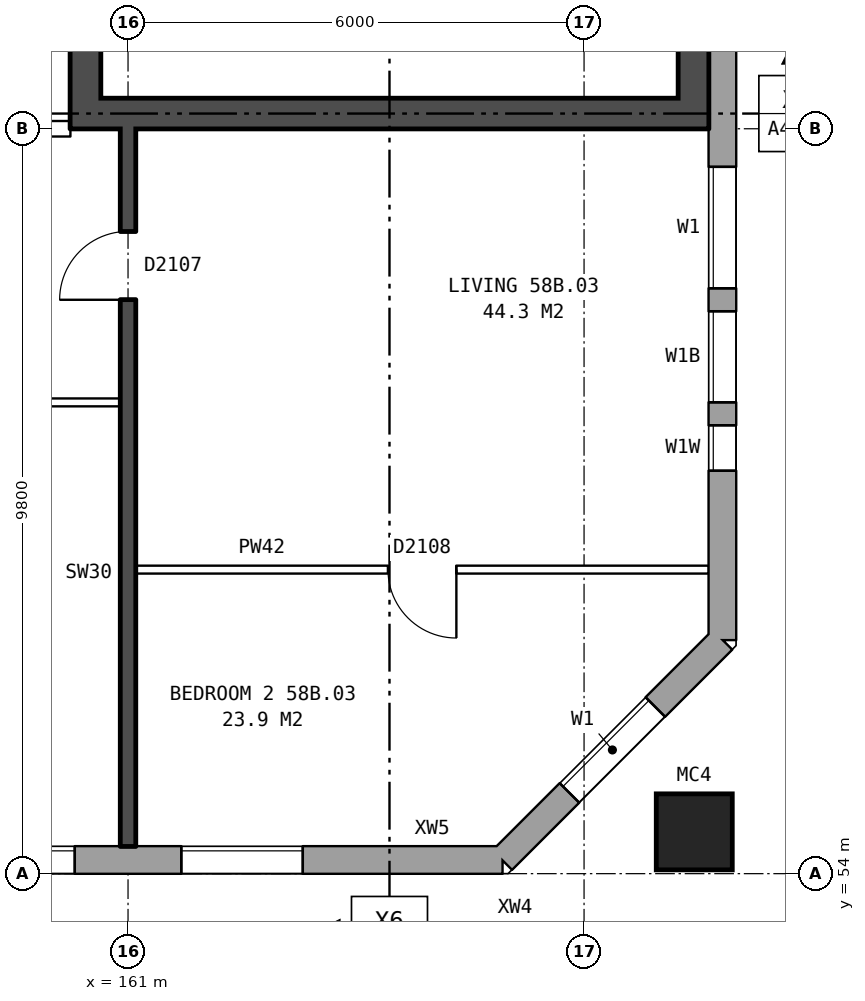
"""IFC4 building model, lengths in metres.
Left out: names, types, materials, properties, quantities, classifications, styles, units other than length and angle.
Written with IfcOpenShell. Run it as: python <this file> out.ifc"""

import sys

from ifc_helpers import new_model, si_unit, direction, frame, frame_2d, origin, origin_2d, place, context, subcontext, project, spatial, rectangle, hollow_rectangle, extrude, element, fill, save


model = new_model("IFC4")
c1 = context("Model", 3, precision=1e-05, world=origin(), true_north=direction((0.0, 1.0)))
c2 = subcontext(c1, "Body", "Model", "MODEL_VIEW")
j1 = project(units=[si_unit("LENGTHUNIT", "METRE"), si_unit("PLANEANGLEUNIT", "RADIAN")], contexts=[c1])
p1 = place(None, origin())
s1 = spatial("IfcSite", under=j1, at=p1, CompositionType="ELEMENT")
p2 = place(p1, origin())
s2 = spatial("IfcBuilding", under=s1, at=p2, CompositionType="ELEMENT")
p3 = place(p2, frame((0.0, 0.0, 205.9)))
s3 = spatial("IfcBuildingStorey", under=s2, at=p3, CompositionType="ELEMENT", Elevation=205.9)
p4 = place(p3, frame((168.45, 54.55, 0.0), z_axis=(0.0, 0.0, 1.0), x_axis=(1.0, 0.0, 0.0)))
e1 = element("IfcColumn", 1, at=p4, inside=s3, PredefinedType="COLUMN", context=c2, shape_type="SweptSolid", body=[
    extrude(hollow_rectangle(XDim=1.0, YDim=1.0, WallThickness=0.055, at=origin_2d()), origin(), (0.0, 0.0, 1.0), 3.1),
])
p5 = place(p3, frame((132.05, 54.18, 0.0), z_axis=(0.0, 0.0, 1.0), x_axis=(1.0, 0.0, 0.0)))
e2 = element("IfcWall", 2, at=p5, inside=s3, PredefinedType="STANDARD", context=c2, shape_type="SweptSolid", body=[
    extrude(rectangle(XDim=33.875, YDim=0.36, at=frame_2d((16.938, 0.0))), origin(), (0.0, 0.0, 1.0), 2.85),
])
p6 = place(p5, frame((0.3, 0.0, 0.9)))
e3 = element("IfcOpeningElement", 3, at=p6, cuts=e2, PredefinedType="OPENING", context=c2, shape_type="SweptSolid", body=[
    extrude(rectangle(XDim=0.8, YDim=1.5, at=frame_2d((0.4, 0.75))), frame((0.0, 0.19, 0.0), z_axis=(0.0, -1.0, 0.0), x_axis=(1.0, 0.0, 0.0)), (0.0, 0.0, 1.0), 0.38),
])
p7 = place(p5, frame((5.65, 0.0, 0.8)))
e4 = element("IfcOpeningElement", 4, at=p7, cuts=e2, PredefinedType="OPENING", context=c2, shape_type="SweptSolid", body=[
    extrude(rectangle(XDim=1.6, YDim=1.8, at=frame_2d((0.8, 0.9))), frame((0.0, 0.19, 0.0), z_axis=(0.0, -1.0, 0.0), x_axis=(1.0, 0.0, 0.0)), (0.0, 0.0, 1.0), 0.38),
])
p8 = place(p5, frame((8.65, 0.0, 0.8)))
e5 = element("IfcOpeningElement", 5, at=p8, cuts=e2, PredefinedType="OPENING", context=c2, shape_type="SweptSolid", body=[
    extrude(rectangle(XDim=1.6, YDim=1.8, at=frame_2d((0.8, 0.9))), frame((0.0, 0.19, 0.0), z_axis=(0.0, -1.0, 0.0), x_axis=(1.0, 0.0, 0.0)), (0.0, 0.0, 1.0), 0.38),
])
p9 = place(p5, frame((11.65, 0.0, 0.8)))
e6 = element("IfcOpeningElement", 6, at=p9, cuts=e2, PredefinedType="OPENING", context=c2, shape_type="SweptSolid", body=[
    extrude(rectangle(XDim=1.6, YDim=1.8, at=frame_2d((0.8, 0.9))), frame((0.0, 0.19, 0.0), z_axis=(0.0, -1.0, 0.0), x_axis=(1.0, 0.0, 0.0)), (0.0, 0.0, 1.0), 0.38),
])
p10 = place(p5, frame((14.65, 0.0, 0.8)))
e7 = element("IfcOpeningElement", 7, at=p10, cuts=e2, PredefinedType="OPENING", context=c2, shape_type="SweptSolid", body=[
    extrude(rectangle(XDim=1.6, YDim=1.8, at=frame_2d((0.8, 0.9))), frame((0.0, 0.19, 0.0), z_axis=(0.0, -1.0, 0.0), x_axis=(1.0, 0.0, 0.0)), (0.0, 0.0, 1.0), 0.38),
])
p11 = place(p5, frame((17.65, 0.0, 0.8)))
e8 = element("IfcOpeningElement", 8, at=p11, cuts=e2, PredefinedType="OPENING", context=c2, shape_type="SweptSolid", body=[
    extrude(rectangle(XDim=1.6, YDim=1.8, at=frame_2d((0.8, 0.9))), frame((0.0, 0.19, 0.0), z_axis=(0.0, -1.0, 0.0), x_axis=(1.0, 0.0, 0.0)), (0.0, 0.0, 1.0), 0.38),
])
p12 = place(p5, frame((20.65, 0.0, 0.8)))
e9 = element("IfcOpeningElement", 9, at=p12, cuts=e2, PredefinedType="OPENING", context=c2, shape_type="SweptSolid", body=[
    extrude(rectangle(XDim=1.6, YDim=1.8, at=frame_2d((0.8, 0.9))), frame((0.0, 0.19, 0.0), z_axis=(0.0, -1.0, 0.0), x_axis=(1.0, 0.0, 0.0)), (0.0, 0.0, 1.0), 0.38),
])
p13 = place(p5, frame((23.65, 0.0, 0.8)))
e10 = element("IfcOpeningElement", 10, at=p13, cuts=e2, PredefinedType="OPENING", context=c2, shape_type="SweptSolid", body=[
    extrude(rectangle(XDim=1.6, YDim=1.8, at=frame_2d((0.8, 0.9))), frame((0.0, 0.19, 0.0), z_axis=(0.0, -1.0, 0.0), x_axis=(1.0, 0.0, 0.0)), (0.0, 0.0, 1.0), 0.38),
])
p14 = place(p5, frame((26.65, 0.0, 0.8)))
e11 = element("IfcOpeningElement", 11, at=p14, cuts=e2, PredefinedType="OPENING", context=c2, shape_type="SweptSolid", body=[
    extrude(rectangle(XDim=1.6, YDim=1.8, at=frame_2d((0.8, 0.9))), frame((0.0, 0.19, 0.0), z_axis=(0.0, -1.0, 0.0), x_axis=(1.0, 0.0, 0.0)), (0.0, 0.0, 1.0), 0.38),
])
p15 = place(p5, frame((29.65, 0.0, 0.8)))
e12 = element("IfcOpeningElement", 12, at=p15, cuts=e2, PredefinedType="OPENING", context=c2, shape_type="SweptSolid", body=[
    extrude(rectangle(XDim=1.6, YDim=1.8, at=frame_2d((0.8, 0.9))), frame((0.0, 0.19, 0.0), z_axis=(0.0, -1.0, 0.0), x_axis=(1.0, 0.0, 0.0)), (0.0, 0.0, 1.0), 0.38),
])
p16 = place(p5, frame((3.2, 0.0, 0.8)))
e13 = element("IfcOpeningElement", 13, at=p16, cuts=e2, PredefinedType="OPENING", context=c2, shape_type="SweptSolid", body=[
    extrude(rectangle(XDim=1.4, YDim=1.8, at=frame_2d((0.7, 0.9))), frame((0.0, 0.19, 0.0), z_axis=(0.0, -1.0, 0.0), x_axis=(1.0, 0.0, 0.0)), (0.0, 0.0, 1.0), 0.38),
])
p17 = place(p3, frame((165.925, 54.18, 0.0), z_axis=(0.0, 0.0, 1.0), x_axis=(0.707106781187, 0.707106781187, 0.0)))
e14 = element("IfcWall", 14, at=p17, inside=s3, PredefinedType="STANDARD", context=c2, shape_type="SweptSolid", body=[
    extrude(rectangle(XDim=4.094, YDim=0.36, at=frame_2d((2.047, 0.0))), origin(), (0.0, 0.0, 1.0), 2.85),
])
p18 = place(p17, frame((1.247, 0.0, 0.8)))
e15 = element("IfcOpeningElement", 15, at=p18, cuts=e14, PredefinedType="OPENING", context=c2, shape_type="SweptSolid", body=[
    extrude(rectangle(XDim=1.6, YDim=1.8, at=frame_2d((0.8, 0.9))), frame((0.0, 0.19, 0.0), z_axis=(0.0, -1.0, 0.0), x_axis=(1.0, 0.0, 0.0)), (0.0, 0.0, 1.0), 0.38),
])
p19 = place(p3, frame((168.82, 57.075, 0.0), z_axis=(0.0, 0.0, 1.0), x_axis=(0.0, 1.0, 0.0)))
e16 = element("IfcWall", 16, at=p19, inside=s3, PredefinedType="STANDARD", context=c2, shape_type="SweptSolid", body=[
    extrude(rectangle(XDim=25.851, YDim=0.36, at=frame_2d((12.925, 0.0))), origin(), (0.0, 0.0, 1.0), 2.85),
])
p20 = place(p19, frame((2.225, 0.0, 0.8)))
e17 = element("IfcOpeningElement", 17, at=p20, cuts=e16, PredefinedType="OPENING", context=c2, shape_type="SweptSolid", body=[
    extrude(rectangle(XDim=0.6, YDim=0.9, at=frame_2d((0.3, 0.45))), frame((0.0, 0.19, 0.0), z_axis=(0.0, -1.0, 0.0), x_axis=(1.0, 0.0, 0.0)), (0.0, 0.0, 1.0), 0.38),
])
p21 = place(p19, frame((4.625, 0.0, 0.8)))
e18 = element("IfcOpeningElement", 18, at=p21, cuts=e16, PredefinedType="OPENING", context=c2, shape_type="SweptSolid", body=[
    extrude(rectangle(XDim=1.6, YDim=1.8, at=frame_2d((0.8, 0.9))), frame((0.0, 0.19, 0.0), z_axis=(0.0, -1.0, 0.0), x_axis=(1.0, 0.0, 0.0)), (0.0, 0.0, 1.0), 0.38),
])
p22 = place(p19, frame((19.625, 0.0, 0.8)))
e19 = element("IfcOpeningElement", 19, at=p22, cuts=e16, PredefinedType="OPENING", context=c2, shape_type="SweptSolid", body=[
    extrude(rectangle(XDim=1.6, YDim=1.8, at=frame_2d((0.8, 0.9))), frame((0.0, 0.19, 0.0), z_axis=(0.0, -1.0, 0.0), x_axis=(1.0, 0.0, 0.0)), (0.0, 0.0, 1.0), 0.38),
])
p23 = place(p19, frame((21.525, 0.0, 0.8)))
e20 = element("IfcOpeningElement", 20, at=p23, cuts=e16, PredefinedType="OPENING", context=c2, shape_type="SweptSolid", body=[
    extrude(rectangle(XDim=1.2, YDim=1.8, at=frame_2d((0.6, 0.9))), frame((0.0, 0.19, 0.0), z_axis=(0.0, -1.0, 0.0), x_axis=(1.0, 0.0, 0.0)), (0.0, 0.0, 1.0), 0.38),
])
p24 = place(p19, frame((3.125, 0.0, 0.8)))
e21 = element("IfcOpeningElement", 21, at=p24, cuts=e16, PredefinedType="OPENING", context=c2, shape_type="SweptSolid", body=[
    extrude(rectangle(XDim=1.2, YDim=1.8, at=frame_2d((0.6, 0.9))), frame((0.0, 0.19, 0.0), z_axis=(0.0, -1.0, 0.0), x_axis=(1.0, 0.0, 0.0)), (0.0, 0.0, 1.0), 0.38),
])
p25 = place(p19, frame((23.025, 0.0, 0.8)))
e22 = element("IfcOpeningElement", 22, at=p25, cuts=e16, PredefinedType="OPENING", context=c2, shape_type="SweptSolid", body=[
    extrude(rectangle(XDim=0.6, YDim=0.9, at=frame_2d((0.3, 0.45))), frame((0.0, 0.19, 0.0), z_axis=(0.0, -1.0, 0.0), x_axis=(1.0, 0.0, 0.0)), (0.0, 0.0, 1.0), 0.38),
])
p26 = place(p3, frame((160.44, 76.2, 0.0), z_axis=(0.0, 0.0, 1.0), x_axis=(0.0, -1.0, 0.0)))
e23 = element("IfcWall", 23, at=p26, inside=s3, PredefinedType="SHEAR", context=c2, shape_type="SweptSolid", body=[
    extrude(rectangle(XDim=12.4, YDim=0.4, at=frame_2d((6.2, 0.0))), origin(), (0.0, 0.0, 1.0), 2.85),
])
p27 = place(p26, frame((1.325, 0.0, 0.0)))
e24 = element("IfcOpeningElement", 24, at=p27, cuts=e23, PredefinedType="OPENING", context=c2, shape_type="SweptSolid", body=[
    extrude(rectangle(XDim=1.1, YDim=2.1, at=frame_2d((0.55, 1.05))), frame((0.0, 0.21, 0.0), z_axis=(0.0, -1.0, 0.0), x_axis=(1.0, 0.0, 0.0)), (0.0, 0.0, 1.0), 0.42),
])
p28 = place(p26, frame((4.825, 0.0, 0.0)))
e25 = element("IfcOpeningElement", 25, at=p28, cuts=e23, PredefinedType="OPENING", context=c2, shape_type="SweptSolid", body=[
    extrude(rectangle(XDim=0.85, YDim=2.1, at=frame_2d((0.425, 1.05))), frame((0.0, 0.21, 0.0), z_axis=(0.0, -1.0, 0.0), x_axis=(1.0, 0.0, 0.0)), (0.0, 0.0, 1.0), 0.42),
])
p29 = place(p26, frame((9.9, 0.0, 0.0)))
e26 = element("IfcOpeningElement", 26, at=p29, cuts=e23, PredefinedType="OPENING", context=c2, shape_type="SweptSolid", body=[
    extrude(rectangle(XDim=1.1, YDim=2.1, at=frame_2d((0.55, 1.05))), frame((0.0, 0.21, 0.0), z_axis=(0.0, -1.0, 0.0), x_axis=(1.0, 0.0, 0.0)), (0.0, 0.0, 1.0), 0.42),
])
p30 = place(p26, frame((8.125, 0.0, 0.0)))
e27 = element("IfcOpeningElement", 27, at=p30, cuts=e23, PredefinedType="OPENING", context=c2, shape_type="SweptSolid", body=[
    extrude(rectangle(XDim=0.85, YDim=2.1, at=frame_2d((0.425, 1.05))), frame((0.0, 0.21, 0.0), z_axis=(0.0, -1.0, 0.0), x_axis=(1.0, 0.0, 0.0)), (0.0, 0.0, 1.0), 0.42),
])
p31 = place(p3, frame((168.44, 76.2, 0.0), z_axis=(0.0, 0.0, 1.0), x_axis=(0.0, -1.0, 0.0)))
e28 = element("IfcWall", 28, at=p31, inside=s3, PredefinedType="SHEAR", context=c2, shape_type="SweptSolid", body=[
    extrude(rectangle(XDim=12.4, YDim=0.4, at=frame_2d((6.2, 0.0))), origin(), (0.0, 0.0, 1.0), 2.85),
])
p32 = place(p3, frame((160.64, 64.0, 0.0), z_axis=(0.0, 0.0, 1.0), x_axis=(1.0, 0.0, 0.0)))
e29 = element("IfcWall", 29, at=p32, inside=s3, PredefinedType="SHEAR", context=c2, shape_type="SweptSolid", body=[
    extrude(rectangle(XDim=7.6, YDim=0.4, at=frame_2d((3.8, 0.0))), origin(), (0.0, 0.0, 1.0), 2.85),
])
p33 = place(p3, frame((161.1, 58.0, 0.0), z_axis=(0.0, 0.0, 1.0), x_axis=(1.0, 0.0, 0.0)))
e30 = element("IfcWall", 30, at=p33, inside=s3, PredefinedType="PARTITIONING", context=c2, shape_type="SweptSolid", body=[
    extrude(rectangle(XDim=7.54, YDim=0.1, at=frame_2d((3.77, 0.0))), origin(), (0.0, 0.0, 1.0), 2.85),
])
p34 = place(p33, frame((3.32, 0.0, 0.0)))
e31 = element("IfcOpeningElement", 31, at=p34, cuts=e30, PredefinedType="OPENING", context=c2, shape_type="SweptSolid", body=[
    extrude(rectangle(XDim=0.9, YDim=2.1, at=frame_2d((0.45, 1.05))), frame((0.0, 0.06, 0.0), z_axis=(0.0, -1.0, 0.0), x_axis=(1.0, 0.0, 0.0)), (0.0, 0.0, 1.0), 0.12),
])
p35 = place(p3, frame((155.1, 60.2, 0.0), z_axis=(0.0, 0.0, 1.0), x_axis=(1.0, 0.0, 0.0)))
e32 = element("IfcWall", 32, at=p35, inside=s3, PredefinedType="PARTITIONING", context=c2, shape_type="SweptSolid", body=[
    extrude(rectangle(XDim=5.8, YDim=0.1, at=frame_2d((2.9, 0.0))), origin(), (0.0, 0.0, 1.0), 2.85),
])
p36 = place(p35, frame((3.6, 0.0, 0.0)))
e33 = element("IfcOpeningElement", 33, at=p36, cuts=e32, PredefinedType="OPENING", context=c2, shape_type="SweptSolid", body=[
    extrude(rectangle(XDim=0.9, YDim=2.1, at=frame_2d((0.45, 1.05))), frame((0.0, 0.06, 0.0), z_axis=(0.0, -1.0, 0.0), x_axis=(1.0, 0.0, 0.0)), (0.0, 0.0, 1.0), 0.12),
])
p37 = place(p35, frame((0.7, 0.0, 0.0)))
e34 = element("IfcOpeningElement", 34, at=p37, cuts=e32, PredefinedType="OPENING", context=c2, shape_type="SweptSolid", body=[
    extrude(rectangle(XDim=0.9, YDim=2.1, at=frame_2d((0.45, 1.05))), frame((0.0, 0.06, 0.0), z_axis=(0.0, -1.0, 0.0), x_axis=(1.0, 0.0, 0.0)), (0.0, 0.0, 1.0), 0.12),
])
p38 = place(p3, frame((157.24, 63.8, 0.0), z_axis=(0.0, 0.0, 1.0), x_axis=(1.0, 0.0, 0.0)))
e35 = element("IfcWall", 35, at=p38, inside=s3, PredefinedType="PARTITIONING", context=c2, shape_type="SweptSolid", body=[
    extrude(rectangle(XDim=3.0, YDim=0.2, at=frame_2d((1.5, 0.0))), origin(), (0.0, 0.0, 1.0), 2.85),
])
p39 = place(p38, frame((1.0, 0.0, 0.0)))
e36 = element("IfcOpeningElement", 36, at=p39, cuts=e35, PredefinedType="OPENING", context=c2, shape_type="SweptSolid", body=[
    extrude(rectangle(XDim=1.0, YDim=2.1, at=frame_2d((0.5, 1.05))), frame((0.0, 0.11, 0.0), z_axis=(0.0, -1.0, 0.0), x_axis=(1.0, 0.0, 0.0)), (0.0, 0.0, 1.0), 0.22),
])
p40 = place(p3, frame((161.0, 54.36, 0.0), z_axis=(0.0, 0.0, 1.0), x_axis=(0.0, 1.0, 0.0)))
e37 = element("IfcWall", 37, at=p40, inside=s3, PredefinedType="SOLIDWALL", context=c2, shape_type="SweptSolid", body=[
    extrude(rectangle(XDim=9.44, YDim=0.2, at=frame_2d((4.72, 0.0))), origin(), (0.0, 0.0, 1.0), 2.85),
])
p41 = place(p40, frame((7.19, 0.0, 0.0)))
e38 = element("IfcOpeningElement", 38, at=p41, cuts=e37, PredefinedType="OPENING", context=c2, shape_type="SweptSolid", body=[
    extrude(rectangle(XDim=0.9, YDim=2.1, at=frame_2d((0.45, 1.05))), frame((0.0, 0.11, 0.0), z_axis=(0.0, -1.0, 0.0), x_axis=(1.0, 0.0, 0.0)), (0.0, 0.0, 1.0), 0.22),
])
p42 = place(p14, origin())
e39 = element("IfcWindow", 39, at=p42, inside=s3, PartitioningType="SINGLE_PANEL", PredefinedType="WINDOW", context=c2, shape_type="SweptSolid", body=[
    extrude(rectangle(XDim=1.6, YDim=1.8, at=frame_2d((0.8, 0.9))), frame((0.0, 0.15, 0.0), z_axis=(0.0, -1.0, 0.0), x_axis=(1.0, 0.0, 0.0)), (0.0, 0.0, 1.0), 0.06),
])
fill(e11, e39)
p43 = place(p15, origin())
e40 = element("IfcWindow", 40, at=p43, inside=s3, PartitioningType="SINGLE_PANEL", PredefinedType="WINDOW", context=c2, shape_type="SweptSolid", body=[
    extrude(rectangle(XDim=1.6, YDim=1.8, at=frame_2d((0.8, 0.9))), frame((0.0, 0.15, 0.0), z_axis=(0.0, -1.0, 0.0), x_axis=(1.0, 0.0, 0.0)), (0.0, 0.0, 1.0), 0.06),
])
fill(e12, e40)
p44 = place(p18, origin())
e41 = element("IfcWindow", 41, at=p44, inside=s3, PartitioningType="SINGLE_PANEL", PredefinedType="WINDOW", context=c2, shape_type="SweptSolid", body=[
    extrude(rectangle(XDim=1.6, YDim=1.8, at=frame_2d((0.8, 0.9))), frame((0.0, 0.15, 0.0), z_axis=(0.0, -1.0, 0.0), x_axis=(1.0, 0.0, 0.0)), (0.0, 0.0, 1.0), 0.06),
])
fill(e15, e41)
p45 = place(p20, origin())
e42 = element("IfcWindow", 42, at=p45, inside=s3, PartitioningType="SINGLE_PANEL", PredefinedType="WINDOW", context=c2, shape_type="SweptSolid", body=[
    extrude(rectangle(XDim=0.6, YDim=0.9, at=frame_2d((0.3, 0.45))), frame((0.0, 0.15, 0.0), z_axis=(0.0, -1.0, 0.0), x_axis=(1.0, 0.0, 0.0)), (0.0, 0.0, 1.0), 0.06),
])
fill(e17, e42)
p46 = place(p21, origin())
e43 = element("IfcWindow", 43, at=p46, inside=s3, PartitioningType="SINGLE_PANEL", PredefinedType="WINDOW", context=c2, shape_type="SweptSolid", body=[
    extrude(rectangle(XDim=1.6, YDim=1.8, at=frame_2d((0.8, 0.9))), frame((0.0, 0.15, 0.0), z_axis=(0.0, -1.0, 0.0), x_axis=(1.0, 0.0, 0.0)), (0.0, 0.0, 1.0), 0.06),
])
fill(e18, e43)
p47 = place(p34, frame((0.9, 0.0, 0.0), z_axis=(0.0, 0.0, 1.0), x_axis=(-1.0, 0.0, 0.0)))
e44 = element("IfcDoor", 44, at=p47, inside=s3, OperationType="SINGLE_SWING_LEFT", PredefinedType="DOOR", context=c2, shape_type="SweptSolid", body=[
    extrude(rectangle(XDim=0.9, YDim=2.1, at=frame_2d((0.45, 1.05))), frame((0.0, 0.025, 0.0), z_axis=(0.0, -1.0, 0.0), x_axis=(1.0, 0.0, 0.0)), (0.0, 0.0, 1.0), 0.05),
])
fill(e31, e44)
p48 = place(p41, origin())
e45 = element("IfcDoor", 45, at=p48, inside=s3, OperationType="SINGLE_SWING_LEFT", PredefinedType="DOOR", context=c2, shape_type="SweptSolid", body=[
    extrude(rectangle(XDim=0.9, YDim=2.1, at=frame_2d((0.45, 1.05))), frame((0.0, 0.025, 0.0), z_axis=(0.0, -1.0, 0.0), x_axis=(1.0, 0.0, 0.0)), (0.0, 0.0, 1.0), 0.05),
])
fill(e38, e45)
p49 = place(p24, origin())
e46 = element("IfcWindow", 46, at=p49, inside=s3, PartitioningType="SINGLE_PANEL", PredefinedType="WINDOW", context=c2, shape_type="SweptSolid", body=[
    extrude(rectangle(XDim=1.2, YDim=1.8, at=frame_2d((0.6, 0.9))), frame((0.0, 0.15, 0.0), z_axis=(0.0, -1.0, 0.0), x_axis=(1.0, 0.0, 0.0)), (0.0, 0.0, 1.0), 0.06),
])
fill(e21, e46)
save(model, sys.argv[1])
